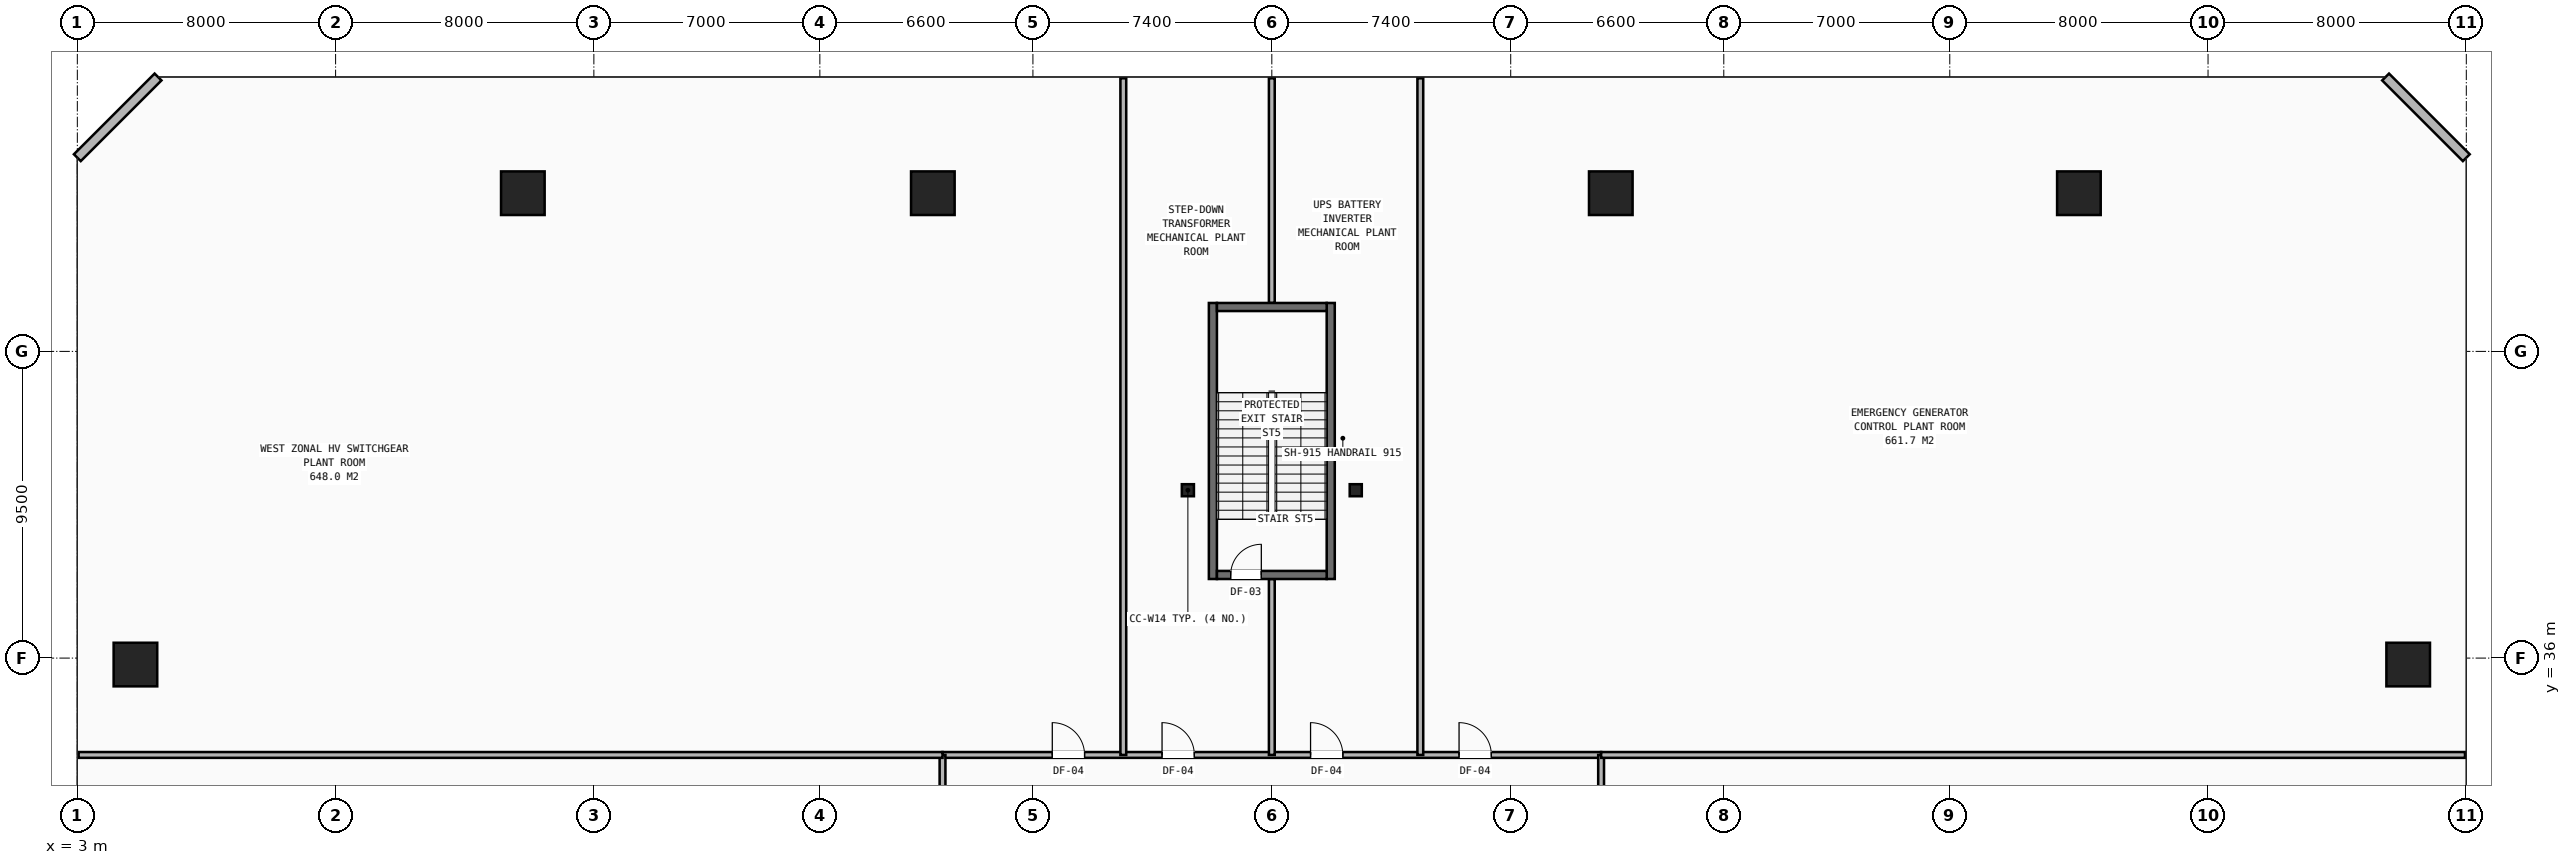
"""IFC4 building model, lengths in metres.
Left out: names, types, materials, properties, quantities, classifications, styles, units other than length and angle.
Written with IfcOpenShell. Run it as: python <this file> out.ifc"""

import sys

from ifc_helpers import new_model, si_unit, direction, frame, frame_2d, origin, origin_2d, place, context, subcontext, project, spatial, rectangle, hollow_rectangle, i_section, extrude, element, fill, save


model = new_model("IFC4")
c1 = context("Model", 3, precision=1e-05, world=origin(), true_north=direction((0.0, 1.0)))
c2 = subcontext(c1, "Body", "Model", "MODEL_VIEW")
j1 = project(units=[si_unit("LENGTHUNIT", "METRE"), si_unit("PLANEANGLEUNIT", "RADIAN")], contexts=[c1])
p1 = place(None, origin())
s1 = spatial("IfcSite", under=j1, at=p1, CompositionType="ELEMENT")
p2 = place(p1, origin())
s2 = spatial("IfcBuilding", under=s1, at=p2, CompositionType="ELEMENT")
p3 = place(p2, frame((0.0, 0.0, 22.0)))
s3 = spatial("IfcBuildingStorey", under=s2, at=p3, CompositionType="ELEMENT", Elevation=22.0)
for number, where, z_axis, x_axis in (
    (1, (37.4, 41.2, 0.0), (0.0, 0.0, 1.0), (1.0, 0.0, 0.0)),
    (2, (42.6, 41.2, 0.0), (0.0, 0.0, 1.0), (1.0, 0.0, 0.0)),
):
    element("IfcColumn", number, at=place(p3, frame(where, z_axis=z_axis, x_axis=x_axis)), inside=s3, PredefinedType="COLUMN", context=c2, shape_type="SweptSolid", body=[
        extrude(i_section(OverallWidth=0.374, OverallDepth=0.372, WebThickness=0.016, FlangeThickness=0.026, at=origin_2d()), origin(), (0.0, 0.0, 1.0), 5.2),
    ])
for number, where, z_axis, x_axis in (
    (3, (4.8, 35.8, 0.0), (0.0, 0.0, 1.0), (1.0, 0.0, 0.0)),
    (4, (75.2, 35.8, 0.0), (0.0, 0.0, 1.0), (1.0, 0.0, 0.0)),
    (5, (16.8, 50.4, 0.0), (0.0, 0.0, 1.0), (1.0, 0.0, 0.0)),
    (6, (29.5, 50.4, 0.0), (0.0, 0.0, 1.0), (1.0, 0.0, 0.0)),
    (7, (50.5, 50.4, 0.0), (0.0, 0.0, 1.0), (1.0, 0.0, 0.0)),
    (8, (65.0, 50.4, 0.0), (0.0, 0.0, 1.0), (1.0, 0.0, 0.0)),
):
    element("IfcColumn", number, at=place(p3, frame(where, z_axis=z_axis, x_axis=x_axis)), inside=s3, PredefinedType="COLUMN", context=c2, shape_type="SweptSolid", body=[
        extrude(hollow_rectangle(XDim=1.35, YDim=1.35, WallThickness=0.085, at=origin_2d()), origin(), (0.0, 0.0, 1.0), 5.2),
    ])
for number, where, z_axis, x_axis in (
    (9, (77.0, 51.5, 0.0), (0.0, 0.0, 1.0), (-0.707, 0.707, 0.0)),
    (10, (5.5, 54.0, 0.0), (0.0, 0.0, 1.0), (-0.707, -0.707, 0.0)),
):
    element("IfcWall", number, at=place(p3, frame(where, z_axis=z_axis, x_axis=x_axis)), inside=s3, PredefinedType="STANDARD", context=c2, shape_type="SweptSolid", body=[
        extrude(rectangle(XDim=3.536, YDim=0.3, at=frame_2d((1.768, 0.0))), origin(), (0.0, 0.0, 1.0), 4.78),
    ])
p4 = place(p3, frame((29.8, 33.0, 0.0), z_axis=(0.0, 0.0, 1.0), x_axis=(1.0, 0.0, 0.0)))
e11 = element("IfcWall", 11, at=p4, inside=s3, PredefinedType="PARTITIONING", context=c2, shape_type="SweptSolid", body=[
    extrude(rectangle(XDim=20.4, YDim=0.18, at=frame_2d((10.2, 0.0))), origin(), (0.0, 0.0, 1.0), 2.52),
])
p5 = place(p4, frame((3.4, 0.0, 0.0)))
e12 = element("IfcOpeningElement", 12, at=p5, cuts=e11, PredefinedType="OPENING", context=c2, shape_type="SweptSolid", body=[
    extrude(rectangle(XDim=1.0, YDim=2.15, at=frame_2d((0.5, 1.075))), frame((0.0, 0.1, 0.0), z_axis=(0.0, -1.0, 0.0), x_axis=(1.0, 0.0, 0.0)), (0.0, 0.0, 1.0), 0.2),
])
p6 = place(p4, frame((6.8, 0.0, 0.0)))
e13 = element("IfcOpeningElement", 13, at=p6, cuts=e11, PredefinedType="OPENING", context=c2, shape_type="SweptSolid", body=[
    extrude(rectangle(XDim=1.0, YDim=2.15, at=frame_2d((0.5, 1.075))), frame((0.0, 0.1, 0.0), z_axis=(0.0, -1.0, 0.0), x_axis=(1.0, 0.0, 0.0)), (0.0, 0.0, 1.0), 0.2),
])
p7 = place(p4, frame((11.4, 0.0, 0.0)))
e14 = element("IfcOpeningElement", 14, at=p7, cuts=e11, PredefinedType="OPENING", context=c2, shape_type="SweptSolid", body=[
    extrude(rectangle(XDim=1.0, YDim=2.15, at=frame_2d((0.5, 1.075))), frame((0.0, 0.1, 0.0), z_axis=(0.0, -1.0, 0.0), x_axis=(1.0, 0.0, 0.0)), (0.0, 0.0, 1.0), 0.2),
])
p8 = place(p4, frame((16.0, 0.0, 0.0)))
e15 = element("IfcOpeningElement", 15, at=p8, cuts=e11, PredefinedType="OPENING", context=c2, shape_type="SweptSolid", body=[
    extrude(rectangle(XDim=1.0, YDim=2.15, at=frame_2d((0.5, 1.075))), frame((0.0, 0.1, 0.0), z_axis=(0.0, -1.0, 0.0), x_axis=(1.0, 0.0, 0.0)), (0.0, 0.0, 1.0), 0.2),
])
p9 = place(p3, frame((29.8, 14.2, 0.0), z_axis=(0.0, 0.0, 1.0), x_axis=(0.0, 1.0, 0.0)))
e16 = element("IfcWall", 16, at=p9, inside=s3, PredefinedType="PARTITIONING", context=c2, shape_type="SweptSolid", body=[
    extrude(rectangle(XDim=18.8, YDim=0.18, at=frame_2d((9.4, 0.0))), origin(), (0.0, 0.0, 1.0), 2.52),
])
p10 = place(p9, frame((5.95, 0.0, 0.0)))
e17 = element("IfcOpeningElement", 17, at=p10, cuts=e16, PredefinedType="OPENING", context=c2, shape_type="SweptSolid", body=[
    extrude(rectangle(XDim=1.0, YDim=2.15, at=frame_2d((0.5, 1.075))), frame((0.0, 0.1, 0.0), z_axis=(0.0, -1.0, 0.0), x_axis=(1.0, 0.0, 0.0)), (0.0, 0.0, 1.0), 0.2),
])
p11 = place(p3, frame((50.2, 14.2, 0.0), z_axis=(0.0, 0.0, 1.0), x_axis=(0.0, 1.0, 0.0)))
e18 = element("IfcWall", 18, at=p11, inside=s3, PredefinedType="PARTITIONING", context=c2, shape_type="SweptSolid", body=[
    extrude(rectangle(XDim=18.8, YDim=0.18, at=frame_2d((9.4, 0.0))), origin(), (0.0, 0.0, 1.0), 2.52),
])
p12 = place(p11, frame((5.95, 0.0, 0.0)))
e19 = element("IfcOpeningElement", 19, at=p12, cuts=e18, PredefinedType="OPENING", context=c2, shape_type="SweptSolid", body=[
    extrude(rectangle(XDim=1.0, YDim=2.15, at=frame_2d((0.5, 1.075))), frame((0.0, 0.1, 0.0), z_axis=(0.0, -1.0, 0.0), x_axis=(1.0, 0.0, 0.0)), (0.0, 0.0, 1.0), 0.2),
])
for number, where, z_axis, x_axis in (
    (20, (3.04, 33.0, 0.0), (0.0, 0.0, 1.0), (1.0, 0.0, 0.0)),
    (21, (50.2, 33.0, 0.0), (0.0, 0.0, 1.0), (1.0, 0.0, 0.0)),
):
    element("IfcWall", number, at=place(p3, frame(where, z_axis=z_axis, x_axis=x_axis)), inside=s3, PredefinedType="PARTITIONING", context=c2, shape_type="SweptSolid", body=[
        extrude(rectangle(XDim=26.76, YDim=0.18, at=frame_2d((13.38, 0.0))), origin(), (0.0, 0.0, 1.0), 2.52),
    ])
p13 = place(p3, frame((35.4, 33.0, 0.0), z_axis=(0.0, 0.0, 1.0), x_axis=(0.0, 1.0, 0.0)))
e22 = element("IfcWall", 22, at=p13, inside=s3, PredefinedType="PARTITIONING", context=c2, shape_type="SweptSolid", body=[
    extrude(rectangle(XDim=20.96, YDim=0.18, at=frame_2d((10.48, 0.0))), origin(), (0.0, 0.0, 1.0), 2.52),
])
p14 = place(p3, frame((40.0, 33.0, 0.0), z_axis=(0.0, 0.0, 1.0), x_axis=(0.0, 1.0, 0.0)))
e23 = element("IfcWall", 23, at=p14, inside=s3, PredefinedType="PARTITIONING", context=c2, shape_type="SweptSolid", body=[
    extrude(rectangle(XDim=5.45, YDim=0.18, at=frame_2d((2.725, 0.0))), origin(), (0.0, 0.0, 1.0), 4.78),
])
p15 = place(p3, frame((40.0, 47.0, 0.0), z_axis=(0.0, 0.0, 1.0), x_axis=(0.0, 1.0, 0.0)))
e24 = element("IfcWall", 24, at=p15, inside=s3, PredefinedType="PARTITIONING", context=c2, shape_type="SweptSolid", body=[
    extrude(rectangle(XDim=6.96, YDim=0.18, at=frame_2d((3.48, 0.0))), origin(), (0.0, 0.0, 1.0), 2.52),
])
p16 = place(p3, frame((44.6, 33.0, 0.0), z_axis=(0.0, 0.0, 1.0), x_axis=(0.0, 1.0, 0.0)))
e25 = element("IfcWall", 25, at=p16, inside=s3, PredefinedType="PARTITIONING", context=c2, shape_type="SweptSolid", body=[
    extrude(rectangle(XDim=20.96, YDim=0.18, at=frame_2d((10.48, 0.0))), origin(), (0.0, 0.0, 1.0), 2.52),
])
for number, where, z_axis, x_axis in (
    (26, (38.175, 38.45, 0.0), (0.0, 0.0, 1.0), (0.0, 1.0, 0.0)),
    (27, (41.825, 38.45, 0.0), (0.0, 0.0, 1.0), (0.0, 1.0, 0.0)),
):
    element("IfcWall", number, at=place(p3, frame(where, z_axis=z_axis, x_axis=x_axis)), inside=s3, PredefinedType="SHEAR", context=c2, shape_type="SweptSolid", body=[
        extrude(rectangle(XDim=8.55, YDim=0.25, at=frame_2d((4.275, 0.0))), origin(), (0.0, 0.0, 1.0), 4.78),
    ])
p17 = place(p3, frame((38.3, 38.575, 0.0), z_axis=(0.0, 0.0, 1.0), x_axis=(1.0, 0.0, 0.0)))
e28 = element("IfcWall", 28, at=p17, inside=s3, PredefinedType="SHEAR", context=c2, shape_type="SweptSolid", body=[
    extrude(rectangle(XDim=3.4, YDim=0.25, at=frame_2d((1.7, 0.0))), origin(), (0.0, 0.0, 1.0), 4.78),
])
p18 = place(p17, frame((0.425, 0.0, 0.0)))
e29 = element("IfcOpeningElement", 29, at=p18, cuts=e28, PredefinedType="OPENING", context=c2, shape_type="SweptSolid", body=[
    extrude(rectangle(XDim=0.95, YDim=2.1, at=frame_2d((0.475, 1.05))), frame((0.0, 0.135, 0.0), z_axis=(0.0, -1.0, 0.0), x_axis=(1.0, 0.0, 0.0)), (0.0, 0.0, 1.0), 0.27),
])
p19 = place(p3, frame((38.3, 46.875, 0.0), z_axis=(0.0, 0.0, 1.0), x_axis=(1.0, 0.0, 0.0)))
e30 = element("IfcWall", 30, at=p19, inside=s3, PredefinedType="SHEAR", context=c2, shape_type="SweptSolid", body=[
    extrude(rectangle(XDim=3.4, YDim=0.25, at=frame_2d((1.7, 0.0))), origin(), (0.0, 0.0, 1.0), 4.78),
])
p20 = place(p5, origin())
e31 = element("IfcDoor", 31, at=p20, inside=s3, OperationType="SINGLE_SWING_LEFT", PredefinedType="DOOR", context=c2, shape_type="SweptSolid", body=[
    extrude(rectangle(XDim=1.0, YDim=2.15, at=frame_2d((0.5, 1.075))), frame((0.0, 0.025, 0.0), z_axis=(0.0, -1.0, 0.0), x_axis=(1.0, 0.0, 0.0)), (0.0, 0.0, 1.0), 0.05),
])
fill(e12, e31)
p21 = place(p6, origin())
e32 = element("IfcDoor", 32, at=p21, inside=s3, OperationType="SINGLE_SWING_LEFT", PredefinedType="DOOR", context=c2, shape_type="SweptSolid", body=[
    extrude(rectangle(XDim=1.0, YDim=2.15, at=frame_2d((0.5, 1.075))), frame((0.0, 0.025, 0.0), z_axis=(0.0, -1.0, 0.0), x_axis=(1.0, 0.0, 0.0)), (0.0, 0.0, 1.0), 0.05),
])
fill(e13, e32)
p22 = place(p7, origin())
e33 = element("IfcDoor", 33, at=p22, inside=s3, OperationType="SINGLE_SWING_LEFT", PredefinedType="DOOR", context=c2, shape_type="SweptSolid", body=[
    extrude(rectangle(XDim=1.0, YDim=2.15, at=frame_2d((0.5, 1.075))), frame((0.0, 0.025, 0.0), z_axis=(0.0, -1.0, 0.0), x_axis=(1.0, 0.0, 0.0)), (0.0, 0.0, 1.0), 0.05),
])
fill(e14, e33)
p23 = place(p8, origin())
e34 = element("IfcDoor", 34, at=p23, inside=s3, OperationType="SINGLE_SWING_LEFT", PredefinedType="DOOR", context=c2, shape_type="SweptSolid", body=[
    extrude(rectangle(XDim=1.0, YDim=2.15, at=frame_2d((0.5, 1.075))), frame((0.0, 0.025, 0.0), z_axis=(0.0, -1.0, 0.0), x_axis=(1.0, 0.0, 0.0)), (0.0, 0.0, 1.0), 0.05),
])
fill(e15, e34)
p24 = place(p18, origin())
e35 = element("IfcDoor", 35, at=p24, inside=s3, OperationType="SINGLE_SWING_RIGHT", PredefinedType="DOOR", context=c2, shape_type="SweptSolid", body=[
    extrude(rectangle(XDim=0.95, YDim=2.1, at=frame_2d((0.475, 1.05))), frame((0.0, 0.025, 0.0), z_axis=(0.0, -1.0, 0.0), x_axis=(1.0, 0.0, 0.0)), (0.0, 0.0, 1.0), 0.05),
])
fill(e29, e35)
save(model, sys.argv[1])
